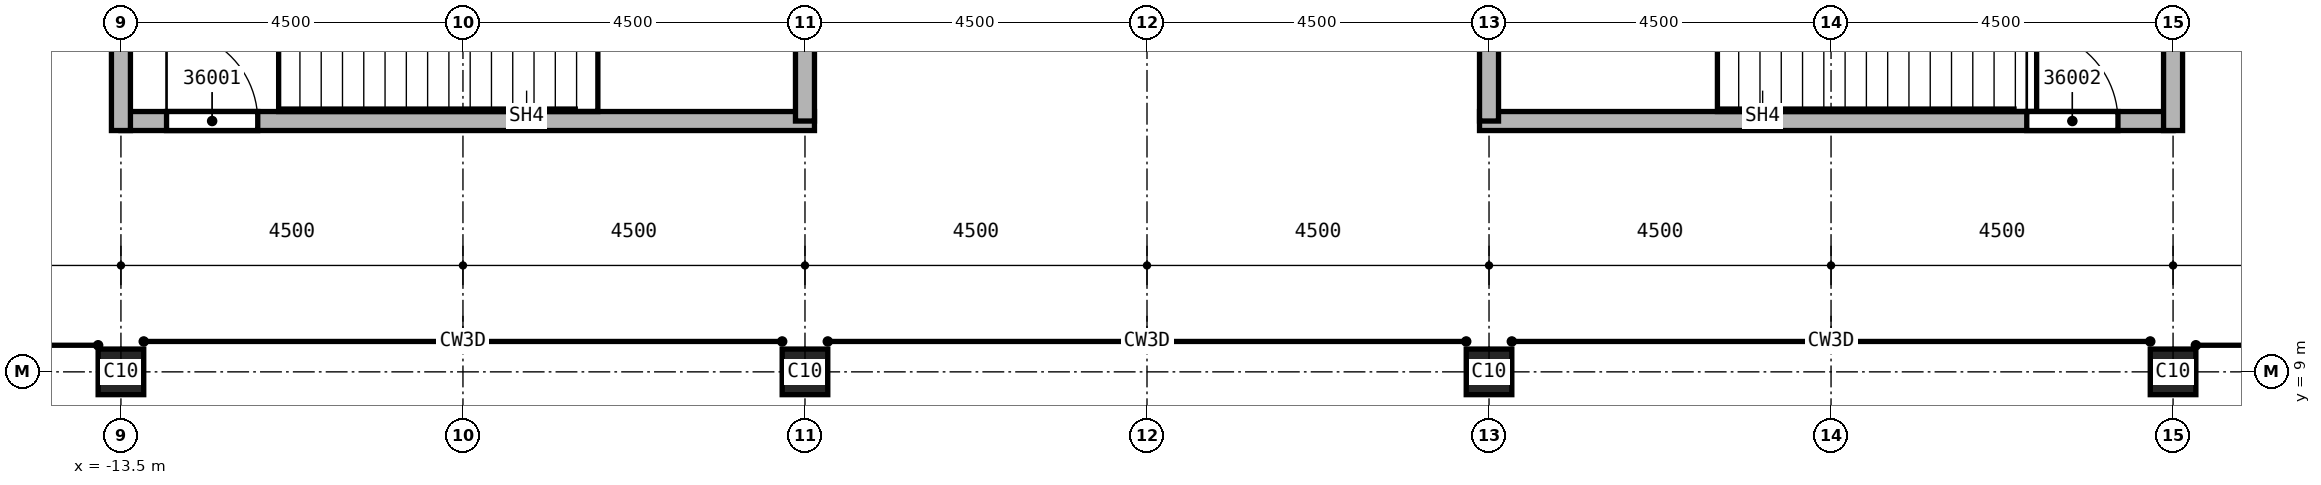
"""IFC4 building model, lengths in metres.
Left out: names, types, materials, properties, quantities, classifications, styles, units other than length and angle.
Written with IfcOpenShell. Run it as: python <this file> out.ifc"""

import sys

from ifc_helpers import new_model, si_unit, direction, frame, frame_2d, origin, origin_2d, place, context, subcontext, project, spatial, rectangle, extrude, element, fill, save


model = new_model("IFC4")
c1 = context("Model", 3, precision=1e-05, world=origin(), true_north=direction((0.0, 1.0)))
c2 = subcontext(c1, "Body", "Model", "MODEL_VIEW")
j1 = project(units=[si_unit("LENGTHUNIT", "METRE"), si_unit("PLANEANGLEUNIT", "RADIAN")], contexts=[c1])
p1 = place(None, origin())
s1 = spatial("IfcSite", under=j1, at=p1, CompositionType="ELEMENT")
p2 = place(p1, origin())
s2 = spatial("IfcBuilding", under=s1, at=p2, CompositionType="ELEMENT")
p3 = place(p2, frame((0.0, 0.0, 381.0)))
s3 = spatial("IfcBuildingStorey", under=s2, at=p3, CompositionType="ELEMENT", Elevation=381.0)
for number, where, z_axis, x_axis in (
    (1, (4.5, 9.0, 0.0), (0.0, 0.0, 1.0), (1.0, 0.0, 0.0)),
    (2, (13.5, 9.0, 0.0), (0.0, 0.0, 1.0), (1.0, 0.0, 0.0)),
    (3, (-4.5, 9.0, 0.0), (0.0, 0.0, 1.0), (1.0, 0.0, 0.0)),
    (4, (-13.5, 9.0, 0.0), (0.0, 0.0, 1.0), (1.0, 0.0, 0.0)),
):
    element("IfcColumn", number, at=place(p3, frame(where, z_axis=z_axis, x_axis=x_axis)), inside=s3, PredefinedType="COLUMN", context=c2, shape_type="SweptSolid", body=[
        extrude(rectangle(XDim=0.6, YDim=0.6, at=origin_2d()), origin(), (0.0, 0.0, 1.0), 4.6),
    ])
p4 = place(p3, frame((-13.5, 12.3, 0.0), z_axis=(0.0, 0.0, 1.0), x_axis=(1.0, 0.0, 0.0)))
e5 = element("IfcWall", 5, at=p4, inside=s3, PredefinedType="SOLIDWALL", context=c2, shape_type="SweptSolid", body=[
    extrude(rectangle(XDim=9.125, YDim=0.25, at=frame_2d((4.562, 0.0))), origin(), (0.0, 0.0, 1.0), 4.15),
])
p5 = place(p4, frame((0.6, 0.0, 0.0)))
e6 = element("IfcOpeningElement", 6, at=p5, cuts=e5, PredefinedType="OPENING", context=c2, shape_type="SweptSolid", body=[
    extrude(rectangle(XDim=1.2, YDim=2.1, at=frame_2d((0.6, 1.05))), frame((0.0, 0.125, 0.0), z_axis=(0.0, -1.0, 0.0), x_axis=(1.0, 0.0, 0.0)), (0.0, 0.0, 1.0), 0.25),
])
p6 = place(p3, frame((-13.5, 12.175, 0.0), z_axis=(0.0, 0.0, 1.0), x_axis=(0.0, 1.0, 0.0)))
e7 = element("IfcWall", 7, at=p6, inside=s3, PredefinedType="SOLIDWALL", context=c2, shape_type="SweptSolid", body=[
    extrude(rectangle(XDim=4.75, YDim=0.25, at=frame_2d((2.375, 0.0))), origin(), (0.0, 0.0, 1.0), 4.15),
])
p7 = place(p3, frame((-4.5, 16.925, 0.0), z_axis=(0.0, 0.0, 1.0), x_axis=(0.0, -1.0, 0.0)))
e8 = element("IfcWall", 8, at=p7, inside=s3, PredefinedType="SOLIDWALL", context=c2, shape_type="SweptSolid", body=[
    extrude(rectangle(XDim=4.625, YDim=0.25, at=frame_2d((2.312, 0.0))), origin(), (0.0, 0.0, 1.0), 4.15),
])
p8 = place(p3, frame((4.375, 12.3, 0.0), z_axis=(0.0, 0.0, 1.0), x_axis=(1.0, 0.0, 0.0)))
e9 = element("IfcWall", 9, at=p8, inside=s3, PredefinedType="SOLIDWALL", context=c2, shape_type="SweptSolid", body=[
    extrude(rectangle(XDim=9.125, YDim=0.25, at=frame_2d((4.562, 0.0))), origin(), (0.0, 0.0, 1.0), 4.15),
])
p9 = place(p8, frame((7.2, 0.0, 0.0)))
e10 = element("IfcOpeningElement", 10, at=p9, cuts=e9, PredefinedType="OPENING", context=c2, shape_type="SweptSolid", body=[
    extrude(rectangle(XDim=1.2, YDim=2.1, at=frame_2d((0.6, 1.05))), frame((0.0, 0.125, 0.0), z_axis=(0.0, -1.0, 0.0), x_axis=(1.0, 0.0, 0.0)), (0.0, 0.0, 1.0), 0.25),
])
p10 = place(p3, frame((4.5, 12.3, 0.0), z_axis=(0.0, 0.0, 1.0), x_axis=(0.0, 1.0, 0.0)))
e11 = element("IfcWall", 11, at=p10, inside=s3, PredefinedType="SOLIDWALL", context=c2, shape_type="SweptSolid", body=[
    extrude(rectangle(XDim=4.625, YDim=0.25, at=frame_2d((2.312, 0.0))), origin(), (0.0, 0.0, 1.0), 4.15),
])
p11 = place(p3, frame((13.5, 12.175, 0.0), z_axis=(0.0, 0.0, 1.0), x_axis=(0.0, 1.0, 0.0)))
e12 = element("IfcWall", 12, at=p11, inside=s3, PredefinedType="SOLIDWALL", context=c2, shape_type="SweptSolid", body=[
    extrude(rectangle(XDim=4.75, YDim=0.25, at=frame_2d((2.375, 0.0))), origin(), (0.0, 0.0, 1.0), 4.15),
])
p12 = place(p5, origin())
e13 = element("IfcDoor", 13, at=p12, inside=s3, OperationType="SINGLE_SWING_RIGHT", PredefinedType="DOOR", context=c2, shape_type="SweptSolid", body=[
    extrude(rectangle(XDim=1.2, YDim=2.1, at=frame_2d((0.6, 1.05))), frame((0.0, 0.025, 0.0), z_axis=(0.0, -1.0, 0.0), x_axis=(1.0, 0.0, 0.0)), (0.0, 0.0, 1.0), 0.05),
])
fill(e6, e13)
p13 = place(p9, origin())
e14 = element("IfcDoor", 14, at=p13, inside=s3, OperationType="SINGLE_SWING_LEFT", PredefinedType="DOOR", context=c2, shape_type="SweptSolid", body=[
    extrude(rectangle(XDim=1.2, YDim=2.1, at=frame_2d((0.6, 1.05))), frame((0.0, 0.025, 0.0), z_axis=(0.0, -1.0, 0.0), x_axis=(1.0, 0.0, 0.0)), (0.0, 0.0, 1.0), 0.05),
])
fill(e10, e14)
save(model, sys.argv[1])
